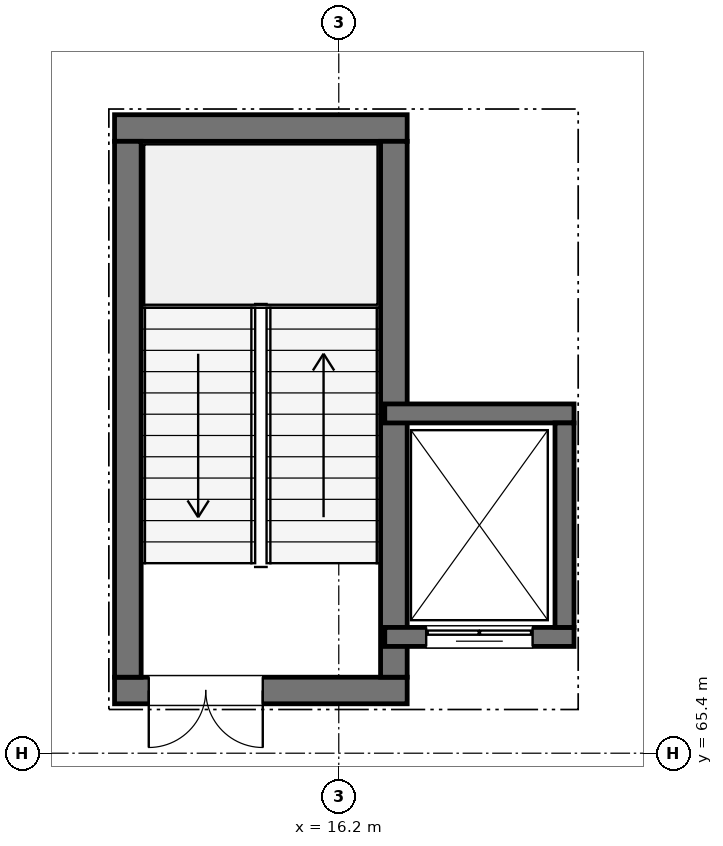
"""IFC4 building model, lengths in metres.
Left out: names, types, materials, properties, quantities, classifications, styles, units other than length and angle.
Written with IfcOpenShell. Run it as: python <this file> out.ifc"""

import sys

from ifc_helpers import new_model, si_unit, direction, frame, frame_2d, origin, place, context, subcontext, project, spatial, rectangle, extrude, element, fill, save


model = new_model("IFC4")
c1 = context("Model", 3, precision=1e-05, world=origin(), true_north=direction((0.0, 1.0)))
c2 = subcontext(c1, "Body", "Model", "MODEL_VIEW")
j1 = project(units=[si_unit("LENGTHUNIT", "METRE"), si_unit("PLANEANGLEUNIT", "RADIAN")], contexts=[c1])
p1 = place(None, origin())
s1 = spatial("IfcSite", under=j1, at=p1, CompositionType="ELEMENT")
p2 = place(p1, origin())
s2 = spatial("IfcBuilding", under=s1, at=p2, CompositionType="ELEMENT")
p3 = place(p2, frame((0.0, 0.0, -4.5)))
s3 = spatial("IfcBuildingStorey", under=s2, at=p3, CompositionType="ELEMENT", Elevation=-4.5)
p4 = place(p3, frame((13.25, 66.225, 0.0), z_axis=(0.0, 0.0, 1.0), x_axis=(1.0, 0.0, 0.0)))
e1 = element("IfcWall", 1, at=p4, inside=s3, PredefinedType="SHEAR", context=c2, shape_type="SweptSolid", body=[
    extrude(rectangle(XDim=3.85, YDim=0.35, at=frame_2d((1.925, 0.0))), origin(), (0.0, 0.0, 1.0), 4.28),
])
p5 = place(p4, frame((0.45, 0.0, 0.0)))
e2 = element("IfcOpeningElement", 2, at=p5, cuts=e1, PredefinedType="OPENING", context=c2, shape_type="SweptSolid", body=[
    extrude(rectangle(XDim=1.5, YDim=2.2, at=frame_2d((0.75, 1.1))), frame((0.0, 0.185, 0.0), z_axis=(0.0, -1.0, 0.0), x_axis=(1.0, 0.0, 0.0)), (0.0, 0.0, 1.0), 0.37),
])
p6 = place(p3, frame((13.25, 73.625, 0.0), z_axis=(0.0, 0.0, 1.0), x_axis=(1.0, 0.0, 0.0)))
e3 = element("IfcWall", 3, at=p6, inside=s3, PredefinedType="SHEAR", context=c2, shape_type="SweptSolid", body=[
    extrude(rectangle(XDim=3.85, YDim=0.35, at=frame_2d((1.925, 0.0))), origin(), (0.0, 0.0, 1.0), 4.28),
])
for number, where, z_axis, x_axis in (
    (4, (13.425, 66.4, 0.0), (0.0, 0.0, 1.0), (0.0, 1.0, 0.0)),
    (5, (16.925, 66.4, 0.0), (0.0, 0.0, 1.0), (0.0, 1.0, 0.0)),
):
    element("IfcWall", number, at=place(p3, frame(where, z_axis=z_axis, x_axis=x_axis)), inside=s3, PredefinedType="SHEAR", context=c2, shape_type="SweptSolid", body=[
        extrude(rectangle(XDim=7.05, YDim=0.35, at=frame_2d((3.525, 0.0))), origin(), (0.0, 0.0, 1.0), 4.28),
    ])
p7 = place(p3, frame((16.805, 66.93, 0.0), z_axis=(0.0, 0.0, 1.0), x_axis=(1.0, 0.0, 0.0)))
e6 = element("IfcWall", 6, at=p7, inside=s3, PredefinedType="SHEAR", context=c2, shape_type="SweptSolid", body=[
    extrude(rectangle(XDim=2.49, YDim=0.25, at=frame_2d((1.245, 0.0))), origin(), (0.0, 0.0, 1.0), 4.26),
])
p8 = place(p7, frame((0.545, 0.0, 0.0)))
e7 = element("IfcOpeningElement", 7, at=p8, cuts=e6, PredefinedType="OPENING", context=c2, shape_type="SweptSolid", body=[
    extrude(rectangle(XDim=1.4, YDim=2.3, at=frame_2d((0.7, 1.15))), frame((0.0, 0.135, 0.0), z_axis=(0.0, -1.0, 0.0), x_axis=(1.0, 0.0, 0.0)), (0.0, 0.0, 1.0), 0.27),
])
p9 = place(p3, frame((16.805, 69.87, 0.0), z_axis=(0.0, 0.0, 1.0), x_axis=(1.0, 0.0, 0.0)))
e8 = element("IfcWall", 8, at=p9, inside=s3, PredefinedType="SHEAR", context=c2, shape_type="SweptSolid", body=[
    extrude(rectangle(XDim=2.49, YDim=0.25, at=frame_2d((1.245, 0.0))), origin(), (0.0, 0.0, 1.0), 4.26),
])
p10 = place(p3, frame((19.17, 67.055, 0.0), z_axis=(0.0, 0.0, 1.0), x_axis=(0.0, 1.0, 0.0)))
e9 = element("IfcWall", 9, at=p10, inside=s3, PredefinedType="SHEAR", context=c2, shape_type="SweptSolid", body=[
    extrude(rectangle(XDim=2.69, YDim=0.25, at=frame_2d((1.345, 0.0))), origin(), (0.0, 0.0, 1.0), 4.26),
])
p11 = place(p5, frame((1.5, 0.0, 0.0), z_axis=(0.0, 0.0, 1.0), x_axis=(-1.0, 0.0, 0.0)))
e10 = element("IfcDoor", 10, at=p11, inside=s3, OperationType="DOUBLE_DOOR_SINGLE_SWING", PredefinedType="DOOR", context=c2, shape_type="SweptSolid", body=[
    extrude(rectangle(XDim=1.5, YDim=2.2, at=frame_2d((0.75, 1.1))), frame((0.0, 0.025, 0.0), z_axis=(0.0, -1.0, 0.0), x_axis=(1.0, 0.0, 0.0)), (0.0, 0.0, 1.0), 0.05),
])
fill(e2, e10)
p12 = place(p8, frame((1.4, 0.0, 0.0), z_axis=(0.0, 0.0, 1.0), x_axis=(-1.0, 0.0, 0.0)))
e11 = element("IfcDoor", 11, at=p12, inside=s3, OperationType="DOUBLE_DOOR_SLIDING", PredefinedType="DOOR", context=c2, shape_type="SweptSolid", body=[
    extrude(rectangle(XDim=1.4, YDim=2.3, at=frame_2d((0.7, 1.15))), frame((0.0, 0.025, 0.0), z_axis=(0.0, -1.0, 0.0), x_axis=(1.0, 0.0, 0.0)), (0.0, 0.0, 1.0), 0.05),
])
fill(e7, e11)
save(model, sys.argv[1])
